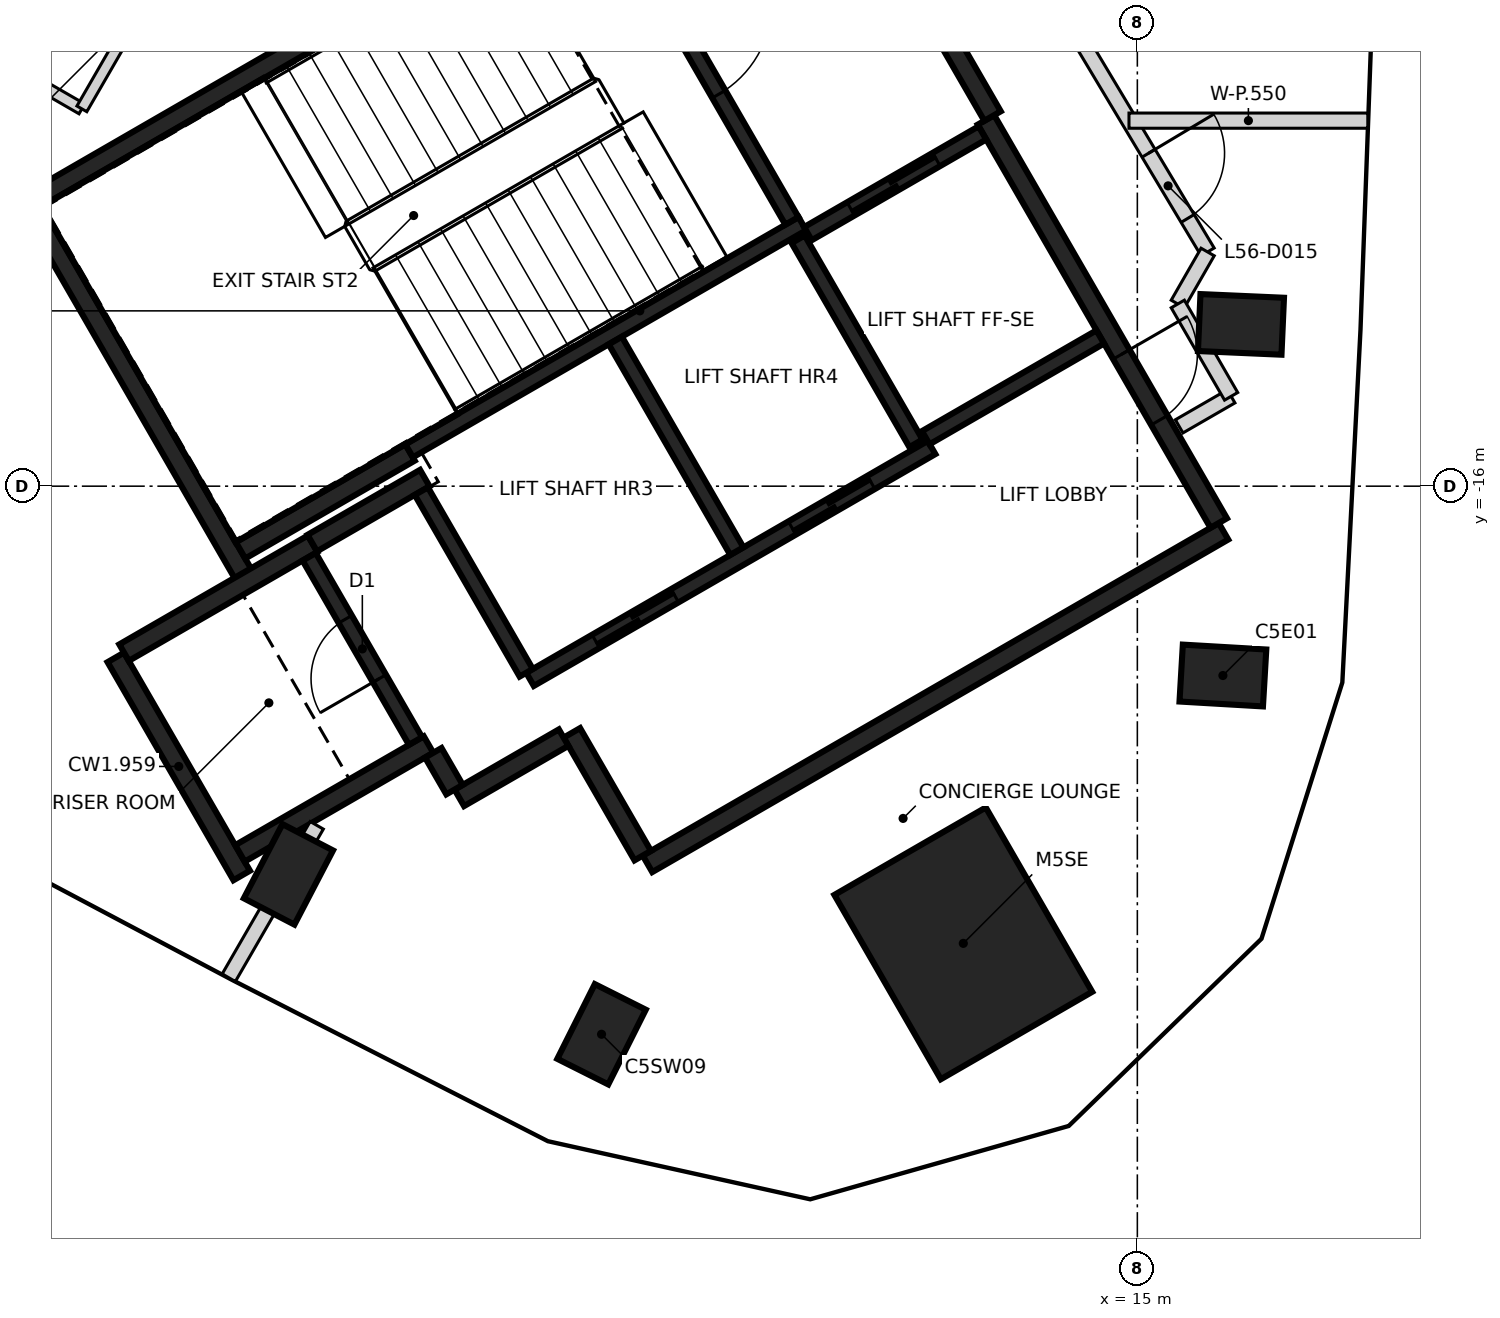
"""IFC4 building model, lengths in metres.
Left out: names, types, materials, properties, quantities, classifications, styles, units other than length and angle.
Written with IfcOpenShell. Run it as: python <this file> out.ifc"""

import sys

from ifc_helpers import new_model, si_unit, direction, frame, frame_2d, origin, origin_2d, place, context, subcontext, project, spatial, rectangle, extrude, element, fill, save


model = new_model("IFC4")
c1 = context("Model", 3, precision=1e-05, world=origin(), true_north=direction((0.0, 1.0)))
c2 = subcontext(c1, "Body", "Model", "MODEL_VIEW")
j1 = project(units=[si_unit("LENGTHUNIT", "METRE"), si_unit("PLANEANGLEUNIT", "RADIAN")], contexts=[c1])
p1 = place(None, origin())
s1 = spatial("IfcSite", under=j1, at=p1, CompositionType="ELEMENT")
p2 = place(p1, origin())
s2 = spatial("IfcBuilding", under=s1, at=p2, CompositionType="ELEMENT")
p3 = place(p2, frame((0.0, 0.0, 225.0)))
s3 = spatial("IfcBuildingStorey", under=s2, at=p3, CompositionType="ELEMENT", Elevation=225.0)
for number, where, z_axis, x_axis in (
    (1, (16.125, -18.491, -0.35), (0.0, 0.0, 1.0), (-0.998, 0.058, 0.0)),
    (2, (16.363, -13.872, -0.35), (0.0, 0.0, 1.0), (-0.999, 0.044, 0.0)),
    (3, (3.832, -21.107, -0.35), (0.0, 0.0, 1.0), (0.461, 0.887, 0.0)),
    (4, (7.951, -23.211, -0.35), (0.0, 0.0, 1.0), (0.449, 0.894, 0.0)),
):
    element("IfcColumn", number, at=place(p3, frame(where, z_axis=z_axis, x_axis=x_axis)), inside=s3, PredefinedType="COLUMN", context=c2, shape_type="SweptSolid", body=[
        extrude(rectangle(XDim=1.1, YDim=0.75, at=origin_2d()), origin(), (0.0, 0.0, 1.0), 3.6),
    ])
p4 = place(p3, frame((12.71, -22.015, -0.35), z_axis=(0.0, 0.0, 1.0), x_axis=(-0.5, 0.866025403784, 0.0)))
e5 = element("IfcColumn", 5, at=p4, inside=s3, PredefinedType="COLUMN", context=c2, shape_type="SweptSolid", body=[
    extrude(rectangle(XDim=2.8, YDim=2.3, at=origin_2d()), origin(), (0.0, 0.0, 1.0), 3.6),
])
p5 = place(p3, frame((0.417, -12.273, 0.0), z_axis=(0.0, 0.0, 1.0), x_axis=(0.866021906294, 0.500006057782, 0.0)))
e6 = element("IfcWall", 6, at=p5, inside=s3, PredefinedType="SHEAR", context=c2, shape_type="SweptSolid", body=[
    extrude(rectangle(XDim=11.55, YDim=0.25, at=frame_2d((5.775, 0.0))), origin(), (0.0, 0.0, 1.0), 3.25),
])
p6 = place(p5, frame((10.025, 0.0, 0.0)))
e7 = element("IfcOpeningElement", 7, at=p6, cuts=e6, PredefinedType="OPENING", context=c2, shape_type="SweptSolid", body=[
    extrude(rectangle(XDim=1.2, YDim=2.1, at=frame_2d((0.6, 1.05))), frame((0.0, 0.135, 0.0), z_axis=(0.0, -1.0, 0.0), x_axis=(1.0, 0.0, 0.0)), (0.0, 0.0, 1.0), 0.27),
])
p7 = place(p5, frame((8.725, 0.0, 0.0)))
e8 = element("IfcOpeningElement", 8, at=p7, cuts=e6, PredefinedType="OPENING", context=c2, shape_type="SweptSolid", body=[
    extrude(rectangle(XDim=1.2, YDim=2.1, at=frame_2d((0.6, 1.05))), frame((0.0, 0.135, 0.0), z_axis=(0.0, -1.0, 0.0), x_axis=(1.0, 0.0, 0.0)), (0.0, 0.0, 1.0), 0.27),
])
p8 = place(p3, frame((16.133, -16.594, 0.0), z_axis=(0.0, 0.0, 1.0), x_axis=(-0.866022959057, -0.500004234368, 0.0)))
e9 = element("IfcWall", 9, at=p8, inside=s3, PredefinedType="SHEAR", context=c2, shape_type="SweptSolid", body=[
    extrude(rectangle(XDim=8.75, YDim=0.25, at=frame_2d((4.375, 0.0))), origin(), (0.0, 0.0, 1.0), 3.25),
])
p9 = place(p3, frame((13.008, -11.181, 0.0), z_axis=(0.0, 0.0, 1.0), x_axis=(0.500001955336, -0.866024274868, 0.0)))
e10 = element("IfcWall", 10, at=p9, inside=s3, PredefinedType="SHEAR", context=c2, shape_type="SweptSolid", body=[
    extrude(rectangle(XDim=6.125, YDim=0.25, at=frame_2d((3.062, 0.0))), origin(), (0.0, 0.0, 1.0), 3.25),
])
p10 = place(p9, frame((3.563, 0.0, 0.0)))
e11 = element("IfcOpeningElement", 11, at=p10, cuts=e10, PredefinedType="OPENING", context=c2, shape_type="SweptSolid", body=[
    extrude(rectangle(XDim=1.0, YDim=2.1, at=frame_2d((0.5, 1.05))), frame((0.0, 0.135, 0.0), z_axis=(0.0, -1.0, 0.0), x_axis=(1.0, 0.0, 0.0)), (0.0, 0.0, 1.0), 0.27),
])
p11 = place(p3, frame((3.235, -17.153, 0.0), z_axis=(0.0, 0.0, 1.0), x_axis=(-0.500008851346, 0.866020293397, 0.0)))
e12 = element("IfcWall", 12, at=p11, inside=s3, PredefinedType="SHEAR", context=c2, shape_type="SweptSolid", body=[
    extrude(rectangle(XDim=5.51, YDim=0.25, at=frame_2d((2.755, 0.0))), origin(), (0.0, 0.0, 1.0), 3.25),
])
p12 = place(p3, frame((10.483, -6.606, 0.0), z_axis=(0.0, 0.0, 1.0), x_axis=(0.49999885962, -0.866026062182, 0.0)))
e13 = element("IfcWall", 13, at=p12, inside=s3, PredefinedType="SHEAR", context=c2, shape_type="SweptSolid", body=[
    extrude(rectangle(XDim=5.225, YDim=0.25, at=frame_2d((2.612, 0.0))), origin(), (0.0, 0.0, 1.0), 3.25),
])
p13 = place(p3, frame((3.217, -21.122, 0.0), z_axis=(0.0, 0.0, 1.0), x_axis=(-0.499998874531, 0.866026053573, 0.0)))
e14 = element("IfcWall", 14, at=p13, inside=s3, PredefinedType="SHEAR", context=c2, shape_type="SweptSolid", body=[
    extrude(rectangle(XDim=3.313, YDim=0.25, at=frame_2d((1.656, 0.0))), origin(), (0.0, 0.0, 1.0), 3.25),
])
p14 = place(p3, frame((1.669, -18.19, 0.0), z_axis=(0.0, 0.0, 1.0), x_axis=(0.866042235819, 0.499970844928, 0.0)))
e15 = element("IfcWall", 15, at=p14, inside=s3, PredefinedType="SHEAR", context=c2, shape_type="SweptSolid", body=[
    extrude(rectangle(XDim=2.865, YDim=0.25, at=frame_2d((1.432, 0.0))), origin(), (0.0, 0.0, 1.0), 3.25),
])
p15 = place(p3, frame((5.675, -19.399, 0.0), z_axis=(0.0, 0.0, 1.0), x_axis=(-0.866026637627, -0.499997862916, 0.0)))
e16 = element("IfcWall", 16, at=p15, inside=s3, PredefinedType="SHEAR", context=c2, shape_type="SweptSolid", body=[
    extrude(rectangle(XDim=2.865, YDim=0.25, at=frame_2d((1.432, 0.0))), origin(), (0.0, 0.0, 1.0), 3.25),
])
p16 = place(p3, frame((5.431, -15.556, 0.0), z_axis=(0.0, 0.0, 1.0), x_axis=(-0.866022940537, -0.500004266446, 0.0)))
e17 = element("IfcWall", 17, at=p16, inside=s3, PredefinedType="SHEAR", context=c2, shape_type="SweptSolid", body=[
    extrude(rectangle(XDim=2.575, YDim=0.25, at=frame_2d((1.287, 0.0))), origin(), (0.0, 0.0, 1.0), 3.25),
])
p17 = place(p3, frame((8.493, -20.86, 0.0), z_axis=(0.0, 0.0, 1.0), x_axis=(-0.500039802285, 0.866002422705, 0.0)))
e18 = element("IfcWall", 18, at=p17, inside=s3, PredefinedType="SHEAR", context=c2, shape_type="SweptSolid", body=[
    extrude(rectangle(XDim=1.865, YDim=0.25, at=frame_2d((0.932, 0.0))), origin(), (0.0, 0.0, 1.0), 3.25),
])
p18 = place(p3, frame((4.145, -16.749, 0.0), z_axis=(0.0, 0.0, 1.0), x_axis=(0.866038183914, 0.499977863513, 0.0)))
e19 = element("IfcWall", 19, at=p18, inside=s3, PredefinedType="SHEAR", context=c2, shape_type="SweptSolid", body=[
    extrude(rectangle(XDim=1.71, YDim=0.25, at=frame_2d((0.855, 0.0))), origin(), (0.0, 0.0, 1.0), 3.25),
])
p19 = place(p3, frame((7.452, -19.308, 0.0), z_axis=(0.0, 0.0, 1.0), x_axis=(-0.866044474677, -0.49996696679, 0.0)))
e20 = element("IfcWall", 20, at=p19, inside=s3, PredefinedType="SHEAR", context=c2, shape_type="SweptSolid", body=[
    extrude(rectangle(XDim=1.584, YDim=0.25, at=frame_2d((0.792, 0.0))), origin(), (0.0, 0.0, 1.0), 3.25),
])
p20 = place(p3, frame((6.017, -19.992, 0.0), z_axis=(0.0, 0.0, 1.0), x_axis=(-0.500364886717, 0.865814633822, 0.0)))
e21 = element("IfcWall", 21, at=p20, inside=s3, PredefinedType="SHEAR", context=c2, shape_type="SweptSolid", body=[
    extrude(rectangle(XDim=0.559, YDim=0.25, at=frame_2d((0.28, 0.0))), origin(), (0.0, 0.0, 1.0), 3.25),
])
p21 = place(p3, frame((5.419, -15.534, 0.0), z_axis=(0.0, 0.0, 1.0), x_axis=(0.866029065029, 0.499993658486, 0.0)))
e22 = element("IfcWall", 22, at=p21, inside=s3, PredefinedType="SHEAR", context=c2, shape_type="SweptSolid", body=[
    extrude(rectangle(XDim=5.974, YDim=0.2, at=frame_2d((2.987, 0.0))), origin(), (0.0, 0.0, 1.0), 3.25),
])
p22 = place(p3, frame((7.01, -18.542, 0.0), z_axis=(0.0, 0.0, 1.0), x_axis=(0.866030299012, 0.499991521122, 0.0)))
e23 = element("IfcWall", 23, at=p22, inside=s3, PredefinedType="SHEAR", context=c2, shape_type="SweptSolid", body=[
    extrude(rectangle(XDim=6.1, YDim=0.2, at=frame_2d((3.05, 0.0))), origin(), (0.0, 0.0, 1.0), 3.25),
])
p23 = place(p22, frame((1.0, 0.0, 0.0)))
e24 = element("IfcOpeningElement", 24, at=p23, cuts=e23, PredefinedType="OPENING", context=c2, shape_type="SweptSolid", body=[
    extrude(rectangle(XDim=1.2, YDim=2.1, at=frame_2d((0.6, 1.05))), frame((0.0, 0.11, 0.0), z_axis=(0.0, -1.0, 0.0), x_axis=(1.0, 0.0, 0.0)), (0.0, 0.0, 1.0), 0.22),
])
p24 = place(p22, frame((3.982, 0.0, 0.0)))
e25 = element("IfcOpeningElement", 25, at=p24, cuts=e23, PredefinedType="OPENING", context=c2, shape_type="SweptSolid", body=[
    extrude(rectangle(XDim=1.2, YDim=2.1, at=frame_2d((0.6, 1.05))), frame((0.0, 0.11, 0.0), z_axis=(0.0, -1.0, 0.0), x_axis=(1.0, 0.0, 0.0)), (0.0, 0.0, 1.0), 0.22),
])
p25 = place(p3, frame((7.906, -8.094, 0.0), z_axis=(0.0, 0.0, 1.0), x_axis=(0.500027839223, -0.866009330205, 0.0)))
e26 = element("IfcWall", 26, at=p25, inside=s3, PredefinedType="SHEAR", context=c2, shape_type="SweptSolid", body=[
    extrude(rectangle(XDim=5.098, YDim=0.2, at=frame_2d((2.549, 0.0))), origin(), (0.0, 0.0, 1.0), 3.25),
])
p26 = place(p25, frame((1.774, 0.0, 0.0)))
e27 = element("IfcOpeningElement", 27, at=p26, cuts=e26, PredefinedType="OPENING", context=c2, shape_type="SweptSolid", body=[
    extrude(rectangle(XDim=1.4, YDim=2.1, at=frame_2d((0.7, 1.05))), frame((0.0, 0.11, 0.0), z_axis=(0.0, -1.0, 0.0), x_axis=(1.0, 0.0, 0.0)), (0.0, 0.0, 1.0), 0.22),
])
p27 = place(p3, frame((8.132, -14.084, 0.0), z_axis=(0.0, 0.0, 1.0), x_axis=(0.499997778408, -0.866026686418, 0.0)))
e28 = element("IfcWall", 28, at=p27, inside=s3, PredefinedType="SHEAR", context=c2, shape_type="SweptSolid", body=[
    extrude(rectangle(XDim=3.198, YDim=0.2, at=frame_2d((1.599, 0.0))), origin(), (0.0, 0.0, 1.0), 3.25),
])
p28 = place(p3, frame((5.503, -19.352, 0.0), z_axis=(0.0, 0.0, 1.0), x_axis=(-0.499986818241, 0.866033014143, 0.0)))
e29 = element("IfcWall", 29, at=p28, inside=s3, PredefinedType="SHEAR", context=c2, shape_type="SweptSolid", body=[
    extrude(rectangle(XDim=2.798, YDim=0.2, at=frame_2d((1.399, 0.0))), origin(), (0.0, 0.0, 1.0), 3.25),
])
p29 = place(p28, frame((0.949, 0.0, 0.0)))
e30 = element("IfcOpeningElement", 30, at=p29, cuts=e29, PredefinedType="OPENING", context=c2, shape_type="SweptSolid", body=[
    extrude(rectangle(XDim=0.9, YDim=2.1, at=frame_2d((0.45, 1.05))), frame((0.0, 0.11, 0.0), z_axis=(0.0, -1.0, 0.0), x_axis=(1.0, 0.0, 0.0)), (0.0, 0.0, 1.0), 0.22),
])
p30 = place(p3, frame((6.96, -18.455, 0.0), z_axis=(0.0, 0.0, 1.0), x_axis=(-0.499926705758, 0.866067716099, 0.0)))
e31 = element("IfcWall", 31, at=p30, inside=s3, PredefinedType="SHEAR", context=c2, shape_type="SweptSolid", body=[
    extrude(rectangle(XDim=2.759, YDim=0.2, at=frame_2d((1.38, 0.0))), origin(), (0.0, 0.0, 1.0), 3.25),
])
p31 = place(p3, frame((12.088, -15.437, 0.0), z_axis=(0.0, 0.0, 1.0), x_axis=(-0.500026960575, 0.86600983753, 0.0)))
e32 = element("IfcWall", 32, at=p31, inside=s3, PredefinedType="SHEAR", context=c2, shape_type="SweptSolid", body=[
    extrude(rectangle(XDim=3.1, YDim=0.2, at=frame_2d((1.55, 0.0))), origin(), (0.0, 0.0, 1.0), 3.25),
])
p32 = place(p3, frame((10.666, -12.678, 0.0), z_axis=(0.0, 0.0, 1.0), x_axis=(0.866018407898, 0.500012117035, 0.0)))
e33 = element("IfcWall", 33, at=p32, inside=s3, PredefinedType="SHEAR", context=c2, shape_type="SweptSolid", body=[
    extrude(rectangle(XDim=2.651, YDim=0.2, at=frame_2d((1.325, 0.0))), origin(), (0.0, 0.0, 1.0), 3.25),
])
p33 = place(p32, frame((0.652, 0.0, 0.0)))
e34 = element("IfcOpeningElement", 34, at=p33, cuts=e33, PredefinedType="OPENING", context=c2, shape_type="SweptSolid", body=[
    extrude(rectangle(XDim=1.3, YDim=2.1, at=frame_2d((0.65, 1.05))), frame((0.0, 0.11, 0.0), z_axis=(0.0, -1.0, 0.0), x_axis=(1.0, 0.0, 0.0)), (0.0, 0.0, 1.0), 0.22),
])
p34 = place(p3, frame((14.512, -14.037, 0.0), z_axis=(0.0, 0.0, 1.0), x_axis=(-0.866018407898, -0.500012117035, 0.0)))
e35 = element("IfcWall", 35, at=p34, inside=s3, PredefinedType="SHEAR", context=c2, shape_type="SweptSolid", body=[
    extrude(rectangle(XDim=2.651, YDim=0.2, at=frame_2d((1.325, 0.0))), origin(), (0.0, 0.0, 1.0), 3.25),
])
p35 = place(p3, frame((11.217, -5.058, 0.0), z_axis=(0.0, 0.0, 1.0), x_axis=(0.513856906336, -0.857875911662, 0.0)))
e36 = element("IfcWall", 36, at=p35, inside=s3, PredefinedType="PARTITIONING", context=c2, shape_type="SweptSolid", body=[
    extrude(rectangle(XDim=9.163, YDim=0.2, at=frame_2d((4.581, 0.0))), origin(), (0.0, 0.0, 1.0), 3.25),
])
p36 = place(p35, frame((7.65, 0.0, 0.0)))
e37 = element("IfcOpeningElement", 37, at=p36, cuts=e36, PredefinedType="OPENING", context=c2, shape_type="SweptSolid", body=[
    extrude(rectangle(XDim=1.0, YDim=2.1, at=frame_2d((0.5, 1.05))), frame((0.0, 0.11, 0.0), z_axis=(0.0, -1.0, 0.0), x_axis=(1.0, 0.0, 0.0)), (0.0, 0.0, 1.0), 0.22),
])
p37 = place(p3, frame((15.55, -15.213, 0.0), z_axis=(0.0, 0.0, 1.0), x_axis=(0.865989998118, 0.500061319399, 0.0)))
e38 = element("IfcWall", 38, at=p37, inside=s3, PredefinedType="PARTITIONING", context=c2, shape_type="SweptSolid", body=[
    extrude(rectangle(XDim=0.79, YDim=0.2, at=frame_2d((0.395, 0.0))), origin(), (0.0, 0.0, 1.0), 2.35),
])
p38 = place(p3, frame((15.532, -13.603, 0.0), z_axis=(0.0, 0.0, 1.0), x_axis=(0.498203662485, 0.867060038686, 0.0)))
e39 = element("IfcWall", 39, at=p38, inside=s3, PredefinedType="PARTITIONING", context=c2, shape_type="SweptSolid", body=[
    extrude(rectangle(XDim=0.789, YDim=0.2, at=frame_2d((0.395, 0.0))), origin(), (0.0, 0.0, 1.0), 3.25),
])
p39 = place(p3, frame((15.532, -13.603, 0.0), z_axis=(0.0, 0.0, 1.0), x_axis=(0.500199332748, -0.865910288378, 0.0)))
e40 = element("IfcWall", 40, at=p39, inside=s3, PredefinedType="PARTITIONING", context=c2, shape_type="SweptSolid", body=[
    extrude(rectangle(XDim=1.403, YDim=0.2, at=frame_2d((0.702, 0.0))), origin(), (0.0, 0.0, 1.0), 2.35),
])
p40 = place(p3, frame((-5.097, -18.078, 0.0), z_axis=(0.0, 0.0, 1.0), x_axis=(0.499960272111, 0.866048339477, 0.0)))
e41 = element("IfcWall", 41, at=p40, inside=s3, PredefinedType="PARTITIONING", context=c2, shape_type="SweptSolid", body=[
    extrude(rectangle(XDim=12.204, YDim=0.2, at=frame_2d((6.102, 0.0))), origin(), (0.0, 0.0, 1.0), 3.25),
])
p41 = place(p3, frame((3.047, -22.467, 0.0), z_axis=(0.0, 0.0, 1.0), x_axis=(0.50001757531, 0.866015256437, 0.0)))
e42 = element("IfcWall", 42, at=p41, inside=s3, PredefinedType="PARTITIONING", context=c2, shape_type="SweptSolid", body=[
    extrude(rectangle(XDim=2.315, YDim=0.2, at=frame_2d((1.158, 0.0))), origin(), (0.0, 0.0, 1.0), 3.25),
])
p42 = place(p3, frame((14.89, -11.191, 0.0), z_axis=(0.0, 0.0, 1.0), x_axis=(1.0, 0.0, 0.0)))
e43 = element("IfcWall", 43, at=p42, inside=s3, PredefinedType="PARTITIONING", context=c2, shape_type="SweptSolid", body=[
    extrude(rectangle(XDim=3.142, YDim=0.2, at=frame_2d((1.571, 0.0))), origin(), (0.0, 0.0, 1.0), 2.35),
])
p43 = place(p3, frame((-2.833, -8.757, 0.0), z_axis=(0.0, 0.0, 1.0), x_axis=(0.866002713795, -0.500039298155, 0.0)))
e44 = element("IfcWall", 44, at=p43, inside=s3, PredefinedType="PARTITIONING", context=c2, shape_type="SweptSolid", body=[
    extrude(rectangle(XDim=4.558, YDim=0.15, at=frame_2d((2.279, 0.0))), origin(), (0.0, 0.0, 1.0), 3.25),
])
p44 = place(p3, frame((1.114, -11.036, 0.0), z_axis=(0.0, 0.0, 1.0), x_axis=(0.50002537861, 0.866010750942, 0.0)))
e45 = element("IfcWall", 45, at=p44, inside=s3, PredefinedType="PARTITIONING", context=c2, shape_type="SweptSolid", body=[
    extrude(rectangle(XDim=3.0, YDim=0.15, at=frame_2d((1.5, 0.0))), origin(), (0.0, 0.0, 1.0), 3.25),
])
p45 = place(p44, frame((1.1, 0.0, 0.0)))
e46 = element("IfcOpeningElement", 46, at=p45, cuts=e45, PredefinedType="OPENING", context=c2, shape_type="SweptSolid", body=[
    extrude(rectangle(XDim=0.8, YDim=2.1, at=frame_2d((0.4, 1.05))), frame((0.0, 0.085, 0.0), z_axis=(0.0, -1.0, 0.0), x_axis=(1.0, 0.0, 0.0)), (0.0, 0.0, 1.0), 0.17),
])
p46 = place(p33, origin())
e47 = element("IfcDoor", 47, at=p46, inside=s3, OperationType="SLIDING_TO_LEFT", PredefinedType="DOOR", context=c2, shape_type="SweptSolid", body=[
    extrude(rectangle(XDim=1.3, YDim=2.1, at=frame_2d((0.65, 1.05))), frame((0.0, 0.025, 0.0), z_axis=(0.0, -1.0, 0.0), x_axis=(1.0, 0.0, 0.0)), (0.0, 0.0, 1.0), 0.05),
])
fill(e34, e47)
p47 = place(p23, origin())
e48 = element("IfcDoor", 48, at=p47, inside=s3, OperationType="DOUBLE_DOOR_SLIDING", PredefinedType="DOOR", context=c2, shape_type="SweptSolid", body=[
    extrude(rectangle(XDim=1.2, YDim=2.1, at=frame_2d((0.6, 1.05))), frame((0.0, 0.025, 0.0), z_axis=(0.0, -1.0, 0.0), x_axis=(1.0, 0.0, 0.0)), (0.0, 0.0, 1.0), 0.05),
])
fill(e24, e48)
p48 = place(p24, origin())
e49 = element("IfcDoor", 49, at=p48, inside=s3, OperationType="DOUBLE_DOOR_SLIDING", PredefinedType="DOOR", context=c2, shape_type="SweptSolid", body=[
    extrude(rectangle(XDim=1.2, YDim=2.1, at=frame_2d((0.6, 1.05))), frame((0.0, 0.025, 0.0), z_axis=(0.0, -1.0, 0.0), x_axis=(1.0, 0.0, 0.0)), (0.0, 0.0, 1.0), 0.05),
])
fill(e25, e49)
p49 = place(p10, origin())
e50 = element("IfcDoor", 50, at=p49, inside=s3, OperationType="SINGLE_SWING_LEFT", PredefinedType="DOOR", context=c2, shape_type="SweptSolid", body=[
    extrude(rectangle(XDim=1.0, YDim=2.1, at=frame_2d((0.5, 1.05))), frame((0.0, 0.025, 0.0), z_axis=(0.0, -1.0, 0.0), x_axis=(1.0, 0.0, 0.0)), (0.0, 0.0, 1.0), 0.05),
])
fill(e11, e50)
p50 = place(p26, origin())
e51 = element("IfcDoor", 51, at=p50, inside=s3, OperationType="SINGLE_SWING_LEFT", PredefinedType="DOOR", context=c2, shape_type="SweptSolid", body=[
    extrude(rectangle(XDim=1.4, YDim=2.1, at=frame_2d((0.7, 1.05))), frame((0.0, 0.025, 0.0), z_axis=(0.0, -1.0, 0.0), x_axis=(1.0, 0.0, 0.0)), (0.0, 0.0, 1.0), 0.05),
])
fill(e27, e51)
p51 = place(p29, origin())
e52 = element("IfcDoor", 52, at=p51, inside=s3, OperationType="SINGLE_SWING_RIGHT", PredefinedType="DOOR", context=c2, shape_type="SweptSolid", body=[
    extrude(rectangle(XDim=0.9, YDim=2.1, at=frame_2d((0.45, 1.05))), frame((0.0, 0.025, 0.0), z_axis=(0.0, -1.0, 0.0), x_axis=(1.0, 0.0, 0.0)), (0.0, 0.0, 1.0), 0.05),
])
fill(e30, e52)
p52 = place(p36, frame((1.0, 0.0, 0.0), z_axis=(0.0, 0.0, 1.0), x_axis=(-1.0, 0.0, 0.0)))
e53 = element("IfcDoor", 53, at=p52, inside=s3, OperationType="SINGLE_SWING_LEFT", PredefinedType="DOOR", context=c2, shape_type="SweptSolid", body=[
    extrude(rectangle(XDim=1.0, YDim=2.1, at=frame_2d((0.5, 1.05))), frame((0.0, 0.025, 0.0), z_axis=(0.0, -1.0, 0.0), x_axis=(1.0, 0.0, 0.0)), (0.0, 0.0, 1.0), 0.05),
])
fill(e37, e53)
save(model, sys.argv[1])
